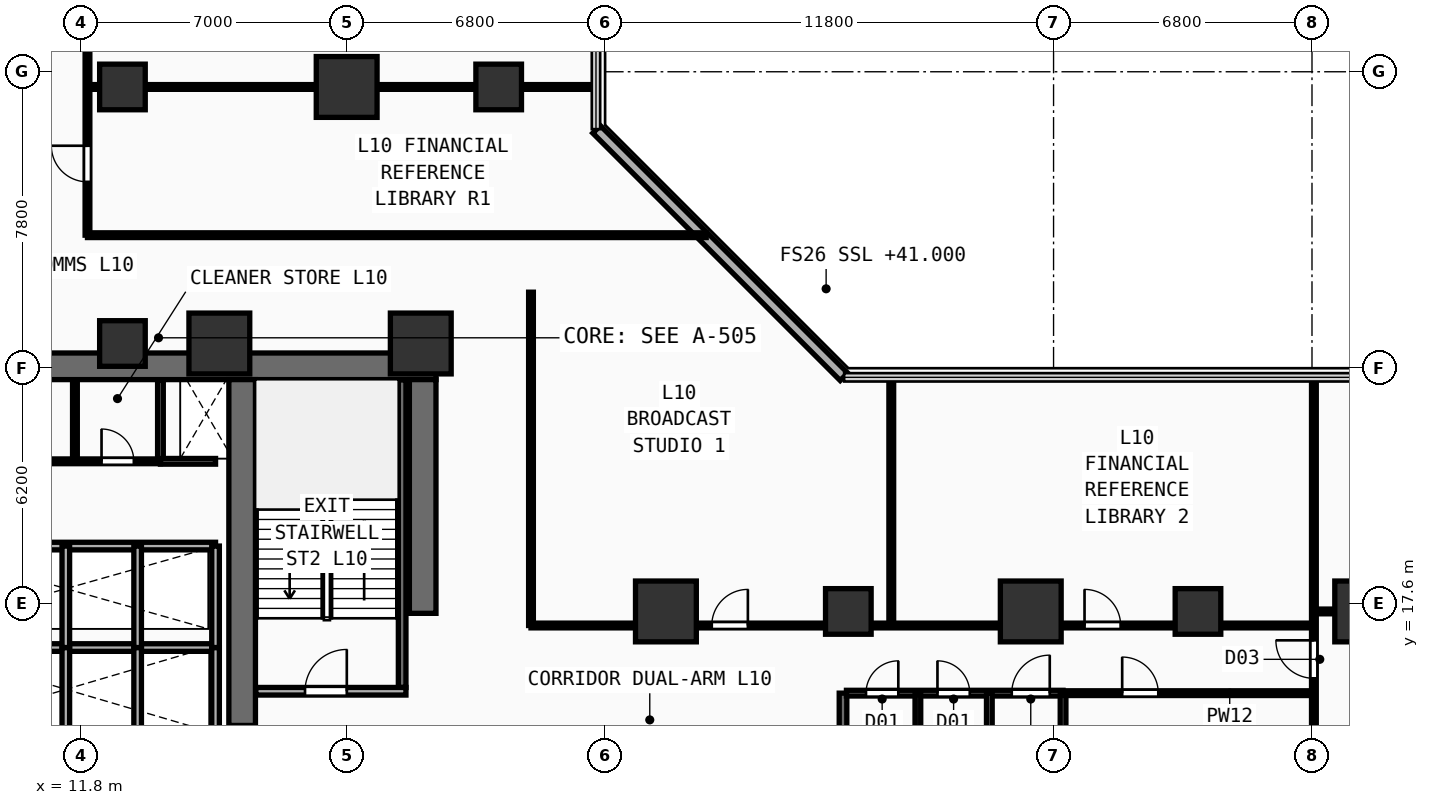
"""IFC4 building model, lengths in metres.
Left out: names, types, materials, properties, quantities, classifications, styles, units other than length and angle.
Written with IfcOpenShell. Run it as: python <this file> out.ifc"""

import sys

from ifc_helpers import new_model, si_unit, direction, frame, frame_2d, origin, origin_2d, place, context, subcontext, project, spatial, rectangle, extrude, element, fill, save


model = new_model("IFC4")
c1 = context("Model", 3, precision=1e-05, world=origin(), true_north=direction((0.0, 1.0)))
c2 = subcontext(c1, "Body", "Model", "MODEL_VIEW")
j1 = project(units=[si_unit("LENGTHUNIT", "METRE"), si_unit("PLANEANGLEUNIT", "RADIAN")], contexts=[c1])
p1 = place(None, origin())
s1 = spatial("IfcSite", under=j1, at=p1, CompositionType="ELEMENT")
p2 = place(p1, origin())
s2 = spatial("IfcBuilding", under=s1, at=p2, CompositionType="ELEMENT")
p3 = place(p2, frame((0.0, 0.0, 41.0)))
s3 = spatial("IfcBuildingStorey", under=s2, at=p3, CompositionType="ELEMENT", Elevation=41.0)
p4 = place(p3, frame((7.1, 23.85, 0.0), z_axis=(0.0, 0.0, 1.0), x_axis=(1.0, 0.0, 0.0)))
e1 = element("IfcWall", 1, at=p4, inside=s3, PredefinedType="SHEAR", context=c2, shape_type="SweptSolid", body=[
    extrude(rectangle(XDim=14.05, YDim=0.7, at=frame_2d((7.025, 0.0))), origin(), (0.0, 0.0, 1.0), 3.54),
])
p5 = place(p3, frame((20.8, 17.35, 0.0), z_axis=(0.0, 0.0, 1.0), x_axis=(0.0, 1.0, 0.0)))
e2 = element("IfcWall", 2, at=p5, inside=s3, PredefinedType="SHEAR", context=c2, shape_type="SweptSolid", body=[
    extrude(rectangle(XDim=6.15, YDim=0.7, at=frame_2d((3.075, 0.0))), origin(), (0.0, 0.0, 1.0), 3.54),
])
p6 = place(p3, frame((16.05, 14.4, 0.0), z_axis=(0.0, 0.0, 1.0), x_axis=(0.0, 1.0, 0.0)))
e3 = element("IfcWall", 3, at=p6, inside=s3, PredefinedType="SHEAR", context=c2, shape_type="SweptSolid", body=[
    extrude(rectangle(XDim=9.1, YDim=0.7, at=frame_2d((4.55, 0.0))), origin(), (0.0, 0.0, 1.0), 3.54),
])
for number, where, z_axis, x_axis in (
    (4, (15.45, 24.45, 0.0), (0.0, 0.0, 1.0), (1.0, 0.0, 0.0)),
    (5, (20.75, 24.45, 0.0), (0.0, 0.0, 1.0), (1.0, 0.0, 0.0)),
    (6, (18.8, 31.2, 0.0), (0.0, 0.0, 1.0), (1.0, 0.0, 0.0)),
    (7, (27.2, 17.4, 0.0), (0.0, 0.0, 1.0), (1.0, 0.0, 0.0)),
    (8, (36.8, 17.4, 0.0), (0.0, 0.0, 1.0), (1.0, 0.0, 0.0)),
    (9, (45.6, 17.4, 0.0), (0.0, 0.0, 1.0), (1.0, 0.0, 0.0)),
):
    element("IfcColumn", number, at=place(p3, frame(where, z_axis=z_axis, x_axis=x_axis)), inside=s3, PredefinedType="COLUMN", context=c2, shape_type="SweptSolid", body=[
        extrude(rectangle(XDim=1.6, YDim=1.6, at=origin_2d()), origin(), (0.0, 0.0, 1.0), 3.54),
    ])
for number, where, z_axis, x_axis in (
    (10, (22.8, 31.2, 0.0), (0.0, 0.0, 1.0), (1.0, 0.0, 0.0)),
    (11, (12.9, 24.45, 0.0), (0.0, 0.0, 1.0), (1.0, 0.0, 0.0)),
    (12, (12.9, 31.2, 0.0), (0.0, 0.0, 1.0), (1.0, 0.0, 0.0)),
    (13, (32.0, 17.4, 0.0), (0.0, 0.0, 1.0), (1.0, 0.0, 0.0)),
    (14, (41.2, 17.4, 0.0), (0.0, 0.0, 1.0), (1.0, 0.0, 0.0)),
):
    element("IfcColumn", number, at=place(p3, frame(where, z_axis=z_axis, x_axis=x_axis)), inside=s3, PredefinedType="COLUMN", context=c2, shape_type="SweptSolid", body=[
        extrude(rectangle(XDim=1.2, YDim=1.2, at=origin_2d()), origin(), (0.0, 0.0, 1.0), 3.54),
    ])
p7 = place(p3, frame((31.885, 23.575, 0.0), z_axis=(0.0, 0.0, 1.0), x_axis=(-0.707106781187, 0.707106781187, 0.0)))
e15 = element("IfcWall", 15, at=p7, inside=s3, PredefinedType="SOLIDWALL", context=c2, shape_type="SweptSolid", body=[
    extrude(rectangle(XDim=9.207, YDim=0.28, at=frame_2d((4.603, 0.0))), origin(), (0.0, 0.0, 1.0), 3.54),
])
p8 = place(p3, frame((20.26, 15.4, 0.0), z_axis=(0.0, 0.0, 1.0), x_axis=(0.0, 1.0, 0.0)))
e16 = element("IfcWall", 16, at=p8, inside=s3, PredefinedType="SHEAR", context=c2, shape_type="SweptSolid", body=[
    extrude(rectangle(XDim=8.09, YDim=0.2, at=frame_2d((4.045, 0.0))), origin(), (0.0, 0.0, 1.0), 3.54),
])
p9 = place(p3, frame((16.41, 15.3, 0.0), z_axis=(0.0, 0.0, 1.0), x_axis=(1.0, 0.0, 0.0)))
e17 = element("IfcWall", 17, at=p9, inside=s3, PredefinedType="PARTITIONING", context=c2, shape_type="SweptSolid", body=[
    extrude(rectangle(XDim=3.95, YDim=0.2, at=frame_2d((1.975, 0.0))), origin(), (0.0, 0.0, 1.0), 3.54),
])
p10 = place(p9, frame((1.294, 0.0, 0.0)))
e18 = element("IfcOpeningElement", 18, at=p10, cuts=e17, PredefinedType="OPENING", context=c2, shape_type="SweptSolid", body=[
    extrude(rectangle(XDim=1.1, YDim=2.2, at=frame_2d((0.55, 1.1))), frame((0.0, 0.11, 0.0), z_axis=(0.0, -1.0, 0.0), x_axis=(1.0, 0.0, 0.0)), (0.0, 0.0, 1.0), 0.22),
])
p11 = place(p3, frame((31.86, 1.44, 0.0), z_axis=(0.0, 0.0, 1.0), x_axis=(0.0, 1.0, 0.0)))
e19 = element("IfcWall", 19, at=p11, inside=s3, PredefinedType="SHEAR", context=c2, shape_type="SweptSolid", body=[
    extrude(rectangle(XDim=13.81, YDim=0.2, at=frame_2d((6.905, 0.0))), origin(), (0.0, 0.0, 1.0), 3.54),
])
p12 = place(p3, frame((7.5, 16.45, 0.0), z_axis=(0.0, 0.0, 1.0), x_axis=(1.0, 0.0, 0.0)))
e20 = element("IfcWall", 20, at=p12, inside=s3, PredefinedType="PARTITIONING", context=c2, shape_type="SweptSolid", body=[
    extrude(rectangle(XDim=7.85, YDim=0.2, at=frame_2d((3.925, 0.0))), origin(), (0.0, 0.0, 1.0), 3.54),
])
for number, where, z_axis, x_axis in (
    (21, (15.35, 14.22, 0.0), (0.0, 0.0, 1.0), (0.0, 1.0, 0.0)),
    (22, (11.41, 14.22, 0.0), (0.0, 0.0, 1.0), (0.0, 1.0, 0.0)),
    (23, (13.3, 14.22, 0.0), (0.0, 0.0, 1.0), (0.0, 1.0, 0.0)),
):
    element("IfcWall", number, at=place(p3, frame(where, z_axis=z_axis, x_axis=x_axis)), inside=s3, PredefinedType="PARTITIONING", context=c2, shape_type="SweptSolid", body=[
        extrude(rectangle(XDim=2.23, YDim=0.2, at=frame_2d((1.115, 0.0))), origin(), (0.0, 0.0, 1.0), 3.54),
    ])
p13 = place(p3, frame((7.5, 19.12, 0.0), z_axis=(0.0, 0.0, 1.0), x_axis=(1.0, 0.0, 0.0)))
e24 = element("IfcWall", 24, at=p13, inside=s3, PredefinedType="PARTITIONING", context=c2, shape_type="SweptSolid", body=[
    extrude(rectangle(XDim=7.85, YDim=0.2, at=frame_2d((3.925, 0.0))), origin(), (0.0, 0.0, 1.0), 3.54),
])
for number, where, z_axis, x_axis in (
    (25, (15.35, 16.45, 0.0), (0.0, 0.0, 1.0), (0.0, 1.0, 0.0)),
    (26, (11.41, 16.45, 0.0), (0.0, 0.0, 1.0), (0.0, 1.0, 0.0)),
    (27, (13.3, 16.45, 0.0), (0.0, 0.0, 1.0), (0.0, 1.0, 0.0)),
):
    element("IfcWall", number, at=place(p3, frame(where, z_axis=z_axis, x_axis=x_axis)), inside=s3, PredefinedType="PARTITIONING", context=c2, shape_type="SweptSolid", body=[
        extrude(rectangle(XDim=2.67, YDim=0.2, at=frame_2d((1.335, 0.0))), origin(), (0.0, 0.0, 1.0), 3.54),
    ])
p14 = place(p3, frame((13.9, 21.35, 0.0), z_axis=(0.0, 0.0, 1.0), x_axis=(0.0, 1.0, 0.0)))
e28 = element("IfcWall", 28, at=p14, inside=s3, PredefinedType="PARTITIONING", context=c2, shape_type="SweptSolid", body=[
    extrude(rectangle(XDim=2.13, YDim=0.15, at=frame_2d((1.065, 0.0))), origin(), (0.0, 0.0, 1.0), 3.54),
])
p15 = place(p3, frame((13.9, 21.35, 0.0), z_axis=(0.0, 0.0, 1.0), x_axis=(1.0, 0.0, 0.0)))
e29 = element("IfcWall", 29, at=p15, inside=s3, PredefinedType="PARTITIONING", context=c2, shape_type="SweptSolid", body=[
    extrude(rectangle(XDim=1.45, YDim=0.15, at=frame_2d((0.725, 0.0))), origin(), (0.0, 0.0, 1.0), 3.54),
])
p16 = place(p3, frame((9.25, 21.35, 0.0), z_axis=(0.0, 0.0, 1.0), x_axis=(1.0, 0.0, 0.0)))
e30 = element("IfcWall", 30, at=p16, inside=s3, PredefinedType="PARTITIONING", context=c2, shape_type="SweptSolid", body=[
    extrude(rectangle(XDim=4.65, YDim=0.125, at=frame_2d((2.325, 0.0))), origin(), (0.0, 0.0, 1.0), 3.54),
])
p17 = place(p16, frame((0.85, 0.0, 0.0)))
e31 = element("IfcOpeningElement", 31, at=p17, cuts=e30, PredefinedType="OPENING", context=c2, shape_type="SweptSolid", body=[
    extrude(rectangle(XDim=0.85, YDim=2.15, at=frame_2d((0.425, 1.075))), frame((0.0, 0.073, 0.0), z_axis=(0.0, -1.0, 0.0), x_axis=(1.0, 0.0, 0.0)), (0.0, 0.0, 1.0), 0.145),
])
p18 = place(p16, frame((3.1, 0.0, 0.0)))
e32 = element("IfcOpeningElement", 32, at=p18, cuts=e30, PredefinedType="OPENING", context=c2, shape_type="SweptSolid", body=[
    extrude(rectangle(XDim=0.85, YDim=2.15, at=frame_2d((0.425, 1.075))), frame((0.0, 0.073, 0.0), z_axis=(0.0, -1.0, 0.0), x_axis=(1.0, 0.0, 0.0)), (0.0, 0.0, 1.0), 0.145),
])
p19 = place(p3, frame((11.65, 21.35, 0.0), z_axis=(0.0, 0.0, 1.0), x_axis=(0.0, 1.0, 0.0)))
e33 = element("IfcWall", 33, at=p19, inside=s3, PredefinedType="PARTITIONING", context=c2, shape_type="SweptSolid", body=[
    extrude(rectangle(XDim=2.13, YDim=0.125, at=frame_2d((1.065, 0.0))), origin(), (0.0, 0.0, 1.0), 3.54),
])
p20 = place(p3, frame((31.95, 15.25, 0.0), z_axis=(0.0, 0.0, 1.0), x_axis=(1.0, 0.0, 0.0)))
e34 = element("IfcWall", 34, at=p20, inside=s3, PredefinedType="PLUMBINGWALL", context=c2, shape_type="SweptSolid", body=[
    extrude(rectangle(XDim=5.7, YDim=0.15, at=frame_2d((2.85, 0.0))), origin(), (0.0, 0.0, 1.0), 3.04),
])
p21 = place(p20, frame((0.515, 0.0, 0.0)))
e35 = element("IfcOpeningElement", 35, at=p21, cuts=e34, PredefinedType="OPENING", context=c2, shape_type="SweptSolid", body=[
    extrude(rectangle(XDim=0.85, YDim=2.15, at=frame_2d((0.425, 1.075))), frame((0.0, 0.085, 0.0), z_axis=(0.0, -1.0, 0.0), x_axis=(1.0, 0.0, 0.0)), (0.0, 0.0, 1.0), 0.17),
])
p22 = place(p20, frame((2.395, 0.0, 0.0)))
e36 = element("IfcOpeningElement", 36, at=p22, cuts=e34, PredefinedType="OPENING", context=c2, shape_type="SweptSolid", body=[
    extrude(rectangle(XDim=0.85, YDim=2.15, at=frame_2d((0.425, 1.075))), frame((0.0, 0.085, 0.0), z_axis=(0.0, -1.0, 0.0), x_axis=(1.0, 0.0, 0.0)), (0.0, 0.0, 1.0), 0.17),
])
p23 = place(p20, frame((4.35, 0.0, 0.0)))
e37 = element("IfcOpeningElement", 37, at=p23, cuts=e34, PredefinedType="OPENING", context=c2, shape_type="SweptSolid", body=[
    extrude(rectangle(XDim=1.0, YDim=2.2, at=frame_2d((0.5, 1.1))), frame((0.0, 0.085, 0.0), z_axis=(0.0, -1.0, 0.0), x_axis=(1.0, 0.0, 0.0)), (0.0, 0.0, 1.0), 0.17),
])
for number, where, z_axis, x_axis in (
    (38, (33.83, 1.44, 0.0), (0.0, 0.0, 1.0), (0.0, 1.0, 0.0)),
    (39, (35.71, 1.44, 0.0), (0.0, 0.0, 1.0), (0.0, 1.0, 0.0)),
    (40, (37.65, 1.44, 0.0), (0.0, 0.0, 1.0), (0.0, 1.0, 0.0)),
):
    element("IfcWall", number, at=place(p3, frame(where, z_axis=z_axis, x_axis=x_axis)), inside=s3, PredefinedType="PLUMBINGWALL", context=c2, shape_type="SweptSolid", body=[
        extrude(rectangle(XDim=13.81, YDim=0.15, at=frame_2d((6.905, 0.0))), origin(), (0.0, 0.0, 1.0), 3.54),
    ])
p24 = place(p3, frame((37.65, 15.25, 0.0), z_axis=(0.0, 0.0, 1.0), x_axis=(1.0, 0.0, 0.0)))
e41 = element("IfcWall", 41, at=p24, inside=s3, PredefinedType="PARTITIONING", context=c2, shape_type="SweptSolid", body=[
    extrude(rectangle(XDim=6.6, YDim=0.125, at=frame_2d((3.3, 0.0))), origin(), (0.0, 0.0, 1.0), 3.04),
])
p25 = place(p24, frame((1.556, 0.0, 0.0)))
e42 = element("IfcOpeningElement", 42, at=p25, cuts=e41, PredefinedType="OPENING", context=c2, shape_type="SweptSolid", body=[
    extrude(rectangle(XDim=0.95, YDim=2.15, at=frame_2d((0.475, 1.075))), frame((0.0, 0.073, 0.0), z_axis=(0.0, -1.0, 0.0), x_axis=(1.0, 0.0, 0.0)), (0.0, 0.0, 1.0), 0.145),
])
p26 = place(p3, frame((44.25, 1.44, 0.0), z_axis=(0.0, 0.0, 1.0), x_axis=(0.0, 1.0, 0.0)))
e43 = element("IfcWall", 43, at=p26, inside=s3, PredefinedType="PARTITIONING", context=c2, shape_type="SweptSolid", body=[
    extrude(rectangle(XDim=22.12, YDim=0.125, at=frame_2d((11.06, 0.0))), origin(), (0.0, 0.0, 1.0), 3.54),
])
p27 = place(p26, frame((14.2, 0.0, 0.0)))
e44 = element("IfcOpeningElement", 44, at=p27, cuts=e43, PredefinedType="OPENING", context=c2, shape_type="SweptSolid", body=[
    extrude(rectangle(XDim=1.0, YDim=2.2, at=frame_2d((0.5, 1.1))), frame((0.0, 0.073, 0.0), z_axis=(0.0, -1.0, 0.0), x_axis=(1.0, 0.0, 0.0)), (0.0, 0.0, 1.0), 0.145),
])
p28 = place(p3, frame((44.25, 17.4, 0.0), z_axis=(0.0, 0.0, 1.0), x_axis=(1.0, 0.0, 0.0)))
e45 = element("IfcWall", 45, at=p28, inside=s3, PredefinedType="PARTITIONING", context=c2, shape_type="SweptSolid", body=[
    extrude(rectangle(XDim=19.71, YDim=0.125, at=frame_2d((9.855, 0.0))), origin(), (0.0, 0.0, 1.0), 3.18),
])
p29 = place(p28, frame((2.95, 0.0, 0.0)))
e46 = element("IfcOpeningElement", 46, at=p29, cuts=e45, PredefinedType="OPENING", context=c2, shape_type="SweptSolid", body=[
    extrude(rectangle(XDim=0.95, YDim=2.15, at=frame_2d((0.475, 1.075))), frame((0.0, 0.073, 0.0), z_axis=(0.0, -1.0, 0.0), x_axis=(1.0, 0.0, 0.0)), (0.0, 0.0, 1.0), 0.145),
])
p30 = place(p3, frame((23.65, 17.03, 0.0), z_axis=(0.0, 0.0, 1.0), x_axis=(0.0, 1.0, 0.0)))
e47 = element("IfcWall", 47, at=p30, inside=s3, PredefinedType="PARTITIONING", context=c2, shape_type="SweptSolid", body=[
    extrude(rectangle(XDim=8.77, YDim=0.125, at=frame_2d((4.385, 0.0))), origin(), (0.0, 0.0, 1.0), 3.54),
])
p31 = place(p3, frame((23.65, 17.03, 0.0), z_axis=(0.0, 0.0, 1.0), x_axis=(1.0, 0.0, 0.0)))
e48 = element("IfcWall", 48, at=p31, inside=s3, PredefinedType="PARTITIONING", context=c2, shape_type="SweptSolid", body=[
    extrude(rectangle(XDim=20.6, YDim=0.125, at=frame_2d((10.3, 0.0))), origin(), (0.0, 0.0, 1.0), 3.18),
])
p32 = place(p31, frame((4.757, 0.0, 0.0)))
e49 = element("IfcOpeningElement", 49, at=p32, cuts=e48, PredefinedType="OPENING", context=c2, shape_type="SweptSolid", body=[
    extrude(rectangle(XDim=0.95, YDim=2.15, at=frame_2d((0.475, 1.075))), frame((0.0, 0.073, 0.0), z_axis=(0.0, -1.0, 0.0), x_axis=(1.0, 0.0, 0.0)), (0.0, 0.0, 1.0), 0.145),
])
p33 = place(p31, frame((14.565, 0.0, 0.0)))
e50 = element("IfcOpeningElement", 50, at=p33, cuts=e48, PredefinedType="OPENING", context=c2, shape_type="SweptSolid", body=[
    extrude(rectangle(XDim=0.95, YDim=2.15, at=frame_2d((0.475, 1.075))), frame((0.0, 0.073, 0.0), z_axis=(0.0, -1.0, 0.0), x_axis=(1.0, 0.0, 0.0)), (0.0, 0.0, 1.0), 0.145),
])
p34 = place(p3, frame((33.13, 17.03, 0.0), z_axis=(0.0, 0.0, 1.0), x_axis=(0.0, 1.0, 0.0)))
e51 = element("IfcWall", 51, at=p34, inside=s3, PredefinedType="PARTITIONING", context=c2, shape_type="SweptSolid", body=[
    extrude(rectangle(XDim=6.53, YDim=0.125, at=frame_2d((3.265, 0.0))), origin(), (0.0, 0.0, 1.0), 3.54),
])
p35 = place(p3, frame((11.98, 27.3, 0.0), z_axis=(0.0, 0.0, 1.0), x_axis=(1.0, 0.0, 0.0)))
e52 = element("IfcWall", 52, at=p35, inside=s3, PredefinedType="PARTITIONING", context=c2, shape_type="SweptSolid", body=[
    extrude(rectangle(XDim=16.28, YDim=0.125, at=frame_2d((8.14, 0.0))), origin(), (0.0, 0.0, 1.0), 3.54),
])
p36 = place(p3, frame((11.98, 27.3, 0.0), z_axis=(0.0, 0.0, 1.0), x_axis=(0.0, 1.0, 0.0)))
e53 = element("IfcWall", 53, at=p36, inside=s3, PredefinedType="PARTITIONING", context=c2, shape_type="SweptSolid", body=[
    extrude(rectangle(XDim=16.8, YDim=0.125, at=frame_2d((8.4, 0.0))), origin(), (0.0, 0.0, 1.0), 3.54),
])
p37 = place(p36, frame((1.403, 0.0, 0.0)))
e54 = element("IfcOpeningElement", 54, at=p37, cuts=e53, PredefinedType="OPENING", context=c2, shape_type="SweptSolid", body=[
    extrude(rectangle(XDim=0.95, YDim=2.15, at=frame_2d((0.475, 1.075))), frame((0.0, 0.073, 0.0), z_axis=(0.0, -1.0, 0.0), x_axis=(1.0, 0.0, 0.0)), (0.0, 0.0, 1.0), 0.145),
])
p38 = place(p36, frame((8.534, 0.0, 0.0)))
e55 = element("IfcOpeningElement", 55, at=p38, cuts=e53, PredefinedType="OPENING", context=c2, shape_type="SweptSolid", body=[
    extrude(rectangle(XDim=0.95, YDim=2.15, at=frame_2d((0.475, 1.075))), frame((0.0, 0.073, 0.0), z_axis=(0.0, -1.0, 0.0), x_axis=(1.0, 0.0, 0.0)), (0.0, 0.0, 1.0), 0.145),
])
p39 = place(p3, frame((11.98, 31.2, 0.0), z_axis=(0.0, 0.0, 1.0), x_axis=(1.0, 0.0, 0.0)))
e56 = element("IfcWall", 56, at=p39, inside=s3, PredefinedType="PARTITIONING", context=c2, shape_type="SweptSolid", body=[
    extrude(rectangle(XDim=13.38, YDim=0.125, at=frame_2d((6.69, 0.0))), origin(), (0.0, 0.0, 1.0), 2.94),
])
p40 = place(p10, origin())
e57 = element("IfcDoor", 57, at=p40, inside=s3, OperationType="SINGLE_SWING_RIGHT", PredefinedType="DOOR", context=c2, shape_type="SweptSolid", body=[
    extrude(rectangle(XDim=1.1, YDim=2.2, at=frame_2d((0.55, 1.1))), frame((0.0, 0.025, 0.0), z_axis=(0.0, -1.0, 0.0), x_axis=(1.0, 0.0, 0.0)), (0.0, 0.0, 1.0), 0.05),
])
fill(e18, e57)
p41 = place(p18, origin())
e58 = element("IfcDoor", 58, at=p41, inside=s3, OperationType="SINGLE_SWING_LEFT", PredefinedType="DOOR", context=c2, shape_type="SweptSolid", body=[
    extrude(rectangle(XDim=0.85, YDim=2.15, at=frame_2d((0.425, 1.075))), frame((0.0, 0.025, 0.0), z_axis=(0.0, -1.0, 0.0), x_axis=(1.0, 0.0, 0.0)), (0.0, 0.0, 1.0), 0.05),
])
fill(e32, e58)
p42 = place(p21, origin())
e59 = element("IfcDoor", 59, at=p42, inside=s3, OperationType="SINGLE_SWING_RIGHT", PredefinedType="DOOR", context=c2, shape_type="SweptSolid", body=[
    extrude(rectangle(XDim=0.85, YDim=2.15, at=frame_2d((0.425, 1.075))), frame((0.0, 0.025, 0.0), z_axis=(0.0, -1.0, 0.0), x_axis=(1.0, 0.0, 0.0)), (0.0, 0.0, 1.0), 0.05),
])
fill(e35, e59)
p43 = place(p22, origin())
e60 = element("IfcDoor", 60, at=p43, inside=s3, OperationType="SINGLE_SWING_LEFT", PredefinedType="DOOR", context=c2, shape_type="SweptSolid", body=[
    extrude(rectangle(XDim=0.85, YDim=2.15, at=frame_2d((0.425, 1.075))), frame((0.0, 0.025, 0.0), z_axis=(0.0, -1.0, 0.0), x_axis=(1.0, 0.0, 0.0)), (0.0, 0.0, 1.0), 0.05),
])
fill(e36, e60)
p44 = place(p23, origin())
e61 = element("IfcDoor", 61, at=p44, inside=s3, OperationType="SINGLE_SWING_RIGHT", PredefinedType="DOOR", context=c2, shape_type="SweptSolid", body=[
    extrude(rectangle(XDim=1.0, YDim=2.2, at=frame_2d((0.5, 1.1))), frame((0.0, 0.025, 0.0), z_axis=(0.0, -1.0, 0.0), x_axis=(1.0, 0.0, 0.0)), (0.0, 0.0, 1.0), 0.05),
])
fill(e37, e61)
p45 = place(p25, origin())
e62 = element("IfcDoor", 62, at=p45, inside=s3, OperationType="SINGLE_SWING_LEFT", PredefinedType="DOOR", context=c2, shape_type="SweptSolid", body=[
    extrude(rectangle(XDim=0.95, YDim=2.15, at=frame_2d((0.475, 1.075))), frame((0.0, 0.025, 0.0), z_axis=(0.0, -1.0, 0.0), x_axis=(1.0, 0.0, 0.0)), (0.0, 0.0, 1.0), 0.05),
])
fill(e42, e62)
p46 = place(p27, origin())
e63 = element("IfcDoor", 63, at=p46, inside=s3, OperationType="SINGLE_SWING_RIGHT", PredefinedType="DOOR", context=c2, shape_type="SweptSolid", body=[
    extrude(rectangle(XDim=1.0, YDim=2.2, at=frame_2d((0.5, 1.1))), frame((0.0, 0.025, 0.0), z_axis=(0.0, -1.0, 0.0), x_axis=(1.0, 0.0, 0.0)), (0.0, 0.0, 1.0), 0.05),
])
fill(e44, e63)
p47 = place(p32, origin())
e64 = element("IfcDoor", 64, at=p47, inside=s3, OperationType="SINGLE_SWING_RIGHT", PredefinedType="DOOR", context=c2, shape_type="SweptSolid", body=[
    extrude(rectangle(XDim=0.95, YDim=2.15, at=frame_2d((0.475, 1.075))), frame((0.0, 0.025, 0.0), z_axis=(0.0, -1.0, 0.0), x_axis=(1.0, 0.0, 0.0)), (0.0, 0.0, 1.0), 0.05),
])
fill(e49, e64)
p48 = place(p33, origin())
e65 = element("IfcDoor", 65, at=p48, inside=s3, OperationType="SINGLE_SWING_LEFT", PredefinedType="DOOR", context=c2, shape_type="SweptSolid", body=[
    extrude(rectangle(XDim=0.95, YDim=2.15, at=frame_2d((0.475, 1.075))), frame((0.0, 0.025, 0.0), z_axis=(0.0, -1.0, 0.0), x_axis=(1.0, 0.0, 0.0)), (0.0, 0.0, 1.0), 0.05),
])
fill(e50, e65)
p49 = place(p37, origin())
e66 = element("IfcDoor", 66, at=p49, inside=s3, OperationType="SINGLE_SWING_RIGHT", PredefinedType="DOOR", context=c2, shape_type="SweptSolid", body=[
    extrude(rectangle(XDim=0.95, YDim=2.15, at=frame_2d((0.475, 1.075))), frame((0.0, 0.025, 0.0), z_axis=(0.0, -1.0, 0.0), x_axis=(1.0, 0.0, 0.0)), (0.0, 0.0, 1.0), 0.05),
])
fill(e54, e66)
save(model, sys.argv[1])
